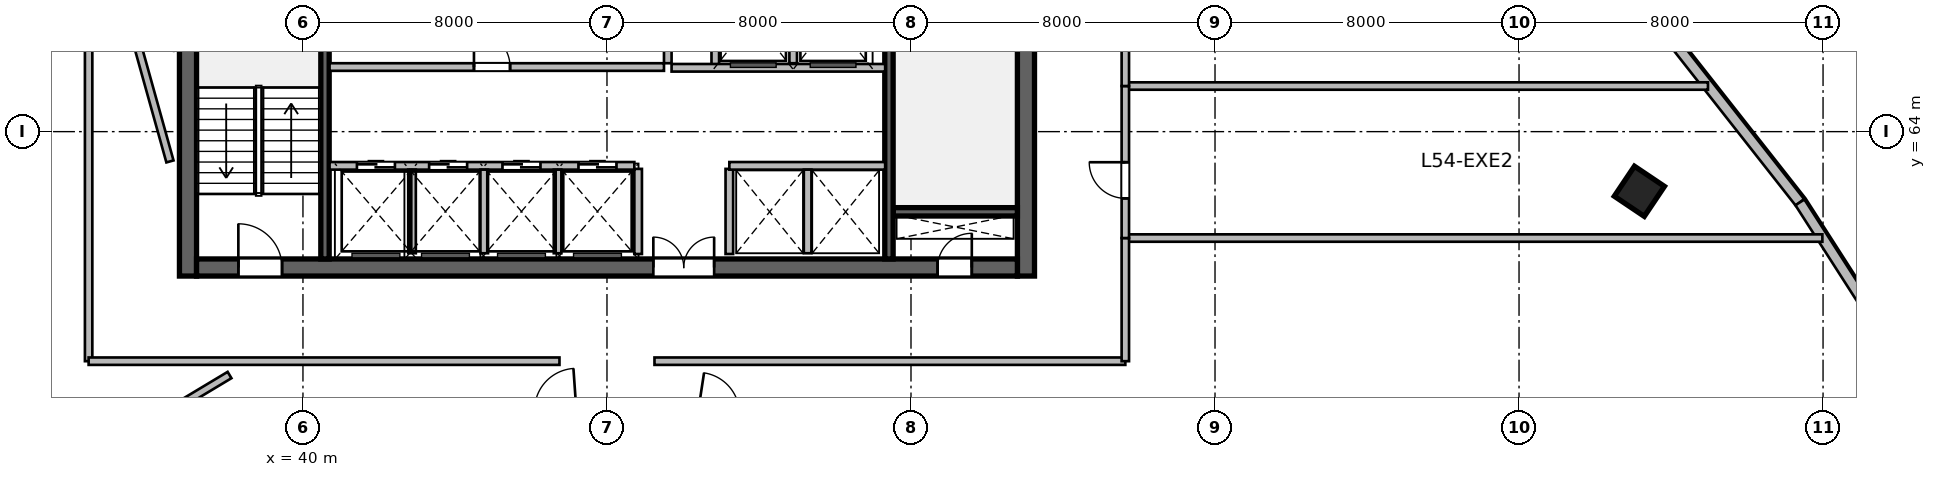
"""IFC4 building model, lengths in metres.
Left out: names, types, materials, properties, quantities, classifications, styles, units other than length and angle.
Written with IfcOpenShell. Run it as: python <this file> out.ifc"""

import sys

from ifc_helpers import new_model, si_unit, direction, frame, frame_2d, origin, origin_2d, place, context, subcontext, project, spatial, rectangle, extrude, source, transform, mapped, element, fill, save


model = new_model("IFC4")
c1 = context("Model", 3, precision=1e-05, world=origin(), true_north=direction((0.0, 1.0)))
c2 = subcontext(c1, "Body", "Model", "MODEL_VIEW")
j1 = project(units=[si_unit("LENGTHUNIT", "METRE"), si_unit("PLANEANGLEUNIT", "RADIAN")], contexts=[c1])
p1 = place(None, origin())
s1 = spatial("IfcSite", under=j1, at=p1, CompositionType="ELEMENT")
p2 = place(p1, origin())
s2 = spatial("IfcBuilding", under=s1, at=p2, CompositionType="ELEMENT")
p3 = place(p2, frame((0.0, 0.0, 223.5)))
s3 = spatial("IfcBuildingStorey", under=s2, at=p3, CompositionType="ELEMENT", Elevation=223.5)
m1 = source(origin(), c2, "Body", "SweptSolid", [
    extrude(rectangle(XDim=12.0, YDim=0.45, at=frame_2d((6.0, 0.0))), origin(), (0.0, 0.0, 1.0), 3.9),
])
for number, where, z_axis, x_axis in (
    (1, (36.975, 60.2, 0.0), (0.0, 0.0, 1.0), (0.0, 1.0, 0.0)),
    (2, (59.025, 60.2, 0.0), (0.0, 0.0, 1.0), (0.0, 1.0, 0.0)),
):
    element("IfcWall", number, at=place(p3, frame(where, z_axis=z_axis, x_axis=x_axis)), inside=s3, PredefinedType="SHEAR", context=c2, shape_type="MappedRepresentation", body=[
        mapped(m1, transform((0.0, 0.0, 0.0), scale=1.0)),
    ])
m2 = source(origin(), c2, "Body", "SweptSolid", [
    extrude(rectangle(XDim=21.6, YDim=0.45, at=frame_2d((10.8, 0.0))), origin(), (0.0, 0.0, 1.0), 3.9),
])
p4 = place(p3, frame((37.2, 60.425, 0.0), z_axis=(0.0, 0.0, 1.0), x_axis=(1.0, 0.0, 0.0)))
e3 = element("IfcWall", 3, at=p4, inside=s3, PredefinedType="SHEAR", context=c2, shape_type="MappedRepresentation", body=[
    mapped(m2, transform((0.0, 0.0, 0.0), scale=1.0)),
])
p5 = place(p4, frame((1.1, 0.0, 0.0)))
e4 = element("IfcOpeningElement", 4, at=p5, cuts=e3, PredefinedType="OPENING", context=c2, shape_type="SweptSolid", body=[
    extrude(rectangle(XDim=1.15, YDim=2.15, at=frame_2d((0.575, 1.075))), frame((0.0, 0.235, 0.0), z_axis=(0.0, -1.0, 0.0), x_axis=(1.0, 0.0, 0.0)), (0.0, 0.0, 1.0), 0.47),
])
p6 = place(p4, frame((19.5, 0.0, 0.0)))
e5 = element("IfcOpeningElement", 5, at=p6, cuts=e3, PredefinedType="OPENING", context=c2, shape_type="SweptSolid", body=[
    extrude(rectangle(XDim=0.9, YDim=2.1, at=frame_2d((0.45, 1.05))), frame((0.0, 0.235, 0.0), z_axis=(0.0, -1.0, 0.0), x_axis=(1.0, 0.0, 0.0)), (0.0, 0.0, 1.0), 0.47),
])
p7 = place(p4, frame((12.02, 0.0, 0.0)))
e6 = element("IfcOpeningElement", 6, at=p7, cuts=e3, PredefinedType="OPENING", context=c2, shape_type="SweptSolid", body=[
    extrude(rectangle(XDim=1.6, YDim=2.15, at=frame_2d((0.8, 1.075))), frame((0.0, 0.235, 0.0), z_axis=(0.0, -1.0, 0.0), x_axis=(1.0, 0.0, 0.0)), (0.0, 0.0, 1.0), 0.47),
])
m3 = source(origin(), c2, "Body", "SweptSolid", [
    extrude(rectangle(XDim=3.27, YDim=0.22, at=frame_2d((1.635, 0.0))), origin(), (0.0, 0.0, 1.0), 3.9),
])
p8 = place(p3, frame((55.53, 61.89, 0.0), z_axis=(0.0, 0.0, 1.0), x_axis=(1.0, 0.0, 0.0)))
e7 = element("IfcWall", 7, at=p8, inside=s3, PredefinedType="SHEAR", context=c2, shape_type="MappedRepresentation", body=[
    mapped(m3, transform((0.0, 0.0, 0.0), scale=1.0)),
])
m4 = source(origin(), c2, "Body", "SweptSolid", [
    extrude(rectangle(XDim=11.1, YDim=0.22, at=frame_2d((5.55, 0.0))), origin(), (0.0, 0.0, 1.0), 3.9),
])
p9 = place(p3, frame((40.58, 60.65, 0.0), z_axis=(0.0, 0.0, 1.0), x_axis=(0.0, 1.0, 0.0)))
e8 = element("IfcWall", 8, at=p9, inside=s3, PredefinedType="SHEAR", context=c2, shape_type="MappedRepresentation", body=[
    mapped(m4, transform((0.0, 0.0, 0.0), scale=1.0)),
])
p10 = place(p3, frame((55.42, 60.65, 0.0), z_axis=(0.0, 0.0, 1.0), x_axis=(0.0, 1.0, 0.0)))
e9 = element("IfcWall", 9, at=p10, inside=s3, PredefinedType="SHEAR", context=c2, shape_type="MappedRepresentation", body=[
    mapped(m4, transform((0.0, 0.0, 0.0), scale=1.0)),
])
p11 = place(p10, frame((9.595, 0.0, 0.0)))
e10 = element("IfcOpeningElement", 10, at=p11, cuts=e9, PredefinedType="OPENING", context=c2, shape_type="SweptSolid", body=[
    extrude(rectangle(XDim=1.15, YDim=2.15, at=frame_2d((0.575, 1.075))), frame((0.0, 0.12, 0.0), z_axis=(0.0, -1.0, 0.0), x_axis=(1.0, 0.0, 0.0)), (0.0, 0.0, 1.0), 0.24),
])
m5 = source(origin(), c2, "Body", "SweptSolid", [
    extrude(rectangle(XDim=0.95, YDim=0.95, at=origin_2d()), origin(), (0.0, 0.0, 1.0), 3.9),
])
p12 = place(p3, frame((75.167, 62.43, 0.0), z_axis=(0.0, 0.0, 1.0), x_axis=(0.55774510898, 0.830012285095, 0.0)))
e11 = element("IfcColumn", 11, at=p12, inside=s3, PredefinedType="COLUMN", context=c2, shape_type="MappedRepresentation", body=[
    mapped(m5, transform((0.0, 0.0, 0.0), scale=1.0)),
])
m6 = source(origin(), c2, "Body", "SweptSolid", [
    extrude(rectangle(XDim=5.153, YDim=0.28, at=frame_2d((2.577, 0.0))), origin(), (0.0, 0.0, 1.0), 3.64),
])
p13 = place(p3, frame((76.205, 66.19, 0.0), z_axis=(0.0, 0.0, 1.0), x_axis=(0.618179283891, -0.786037132054, 0.0)))
e12 = element("IfcWall", 12, at=p13, inside=s3, PredefinedType="SOLIDWALL", context=c2, shape_type="MappedRepresentation", body=[
    mapped(m6, transform((0.0, 0.0, 0.0), scale=1.0)),
])
m7 = source(origin(), c2, "Body", "SweptSolid", [
    extrude(rectangle(XDim=5.303, YDim=0.28, at=frame_2d((2.651, 0.0))), origin(), (0.0, 0.0, 1.0), 3.64),
])
p14 = place(p3, frame((79.391, 62.14, 0.0), z_axis=(0.0, 0.0, 1.0), x_axis=(0.540178067041, -0.84155074469, 0.0)))
e13 = element("IfcWall", 13, at=p14, inside=s3, PredefinedType="SOLIDWALL", context=c2, shape_type="MappedRepresentation", body=[
    mapped(m7, transform((0.0, 0.0, 0.0), scale=1.0)),
])
m8 = source(origin(), c2, "Body", "SweptSolid", [
    extrude(rectangle(XDim=2.24, YDim=0.2, at=frame_2d((1.12, 0.0))), origin(), (0.0, 0.0, 1.0), 3.64),
])
for number, where, z_axis, x_axis in (
    (14, (48.82, 60.78, 0.0), (0.0, 0.0, 1.0), (0.0, 1.0, 0.0)),
    (15, (51.22, 60.78, 0.0), (0.0, 0.0, 1.0), (0.0, 1.0, 0.0)),
):
    element("IfcWall", number, at=place(p3, frame(where, z_axis=z_axis, x_axis=x_axis)), inside=s3, PredefinedType="SOLIDWALL", context=c2, shape_type="MappedRepresentation", body=[
        mapped(m8, transform((0.0, 0.0, 0.0), scale=1.0)),
    ])
m9 = source(origin(), c2, "Body", "SweptSolid", [
    extrude(rectangle(XDim=5.8, YDim=0.2, at=frame_2d((2.9, 0.0))), origin(), (0.0, 0.0, 1.0), 3.64),
])
p15 = place(p3, frame((49.6, 65.8, 0.0), z_axis=(0.0, 0.0, 1.0), x_axis=(0.0, 1.0, 0.0)))
e16 = element("IfcWall", 16, at=p15, inside=s3, PredefinedType="SOLIDWALL", context=c2, shape_type="MappedRepresentation", body=[
    mapped(m9, transform((0.0, 0.0, 0.0), scale=1.0)),
])
m10 = source(origin(), c2, "Body", "SweptSolid", [
    extrude(rectangle(XDim=2.58, YDim=0.2, at=frame_2d((1.29, 0.0))), origin(), (0.0, 0.0, 1.0), 3.64),
])
p16 = place(p3, frame((50.85, 65.68, 0.0), z_axis=(0.0, 0.0, 1.0), x_axis=(0.0, 1.0, 0.0)))
e17 = element("IfcWall", 17, at=p16, inside=s3, PredefinedType="SOLIDWALL", context=c2, shape_type="MappedRepresentation", body=[
    mapped(m10, transform((0.0, 0.0, 0.0), scale=1.0)),
])
m11 = source(origin(), c2, "Body", "SweptSolid", [
    extrude(rectangle(XDim=2.4, YDim=0.2, at=frame_2d((1.2, 0.0))), origin(), (0.0, 0.0, 1.0), 3.64),
])
p17 = place(p3, frame((52.9, 65.8, 0.0), z_axis=(0.0, 0.0, 1.0), x_axis=(0.0, 1.0, 0.0)))
e18 = element("IfcWall", 18, at=p17, inside=s3, PredefinedType="SOLIDWALL", context=c2, shape_type="MappedRepresentation", body=[
    mapped(m11, transform((0.0, 0.0, 0.0), scale=1.0)),
])
m12 = source(origin(), c2, "Body", "SweptSolid", [
    extrude(rectangle(XDim=5.62, YDim=0.2, at=frame_2d((2.81, 0.0))), origin(), (0.0, 0.0, 1.0), 3.64),
])
p18 = place(p3, frame((49.7, 65.68, 0.0), z_axis=(0.0, 0.0, 1.0), x_axis=(1.0, 0.0, 0.0)))
e19 = element("IfcWall", 19, at=p18, inside=s3, PredefinedType="SOLIDWALL", context=c2, shape_type="MappedRepresentation", body=[
    mapped(m12, transform((0.0, 0.0, 0.0), scale=1.0)),
])
m13 = source(origin(), c2, "Body", "SweptSolid", [
    extrude(rectangle(XDim=8.02, YDim=0.2, at=frame_2d((4.01, 0.0))), origin(), (0.0, 0.0, 1.0), 3.64),
])
p19 = place(p3, frame((40.7, 63.1, 0.0), z_axis=(0.0, 0.0, 1.0), x_axis=(1.0, 0.0, 0.0)))
e20 = element("IfcWall", 20, at=p19, inside=s3, PredefinedType="SOLIDWALL", context=c2, shape_type="MappedRepresentation", body=[
    mapped(m13, transform((0.0, 0.0, 0.0), scale=1.0)),
])
p20 = place(p19, frame((0.72, 0.0, 0.0)))
e21 = element("IfcOpeningElement", 21, at=p20, cuts=e20, PredefinedType="OPENING", context=c2, shape_type="SweptSolid", body=[
    extrude(rectangle(XDim=1.0, YDim=2.15, at=frame_2d((0.5, 1.075))), frame((0.0, 0.11, 0.0), z_axis=(0.0, -1.0, 0.0), x_axis=(1.0, 0.0, 0.0)), (0.0, 0.0, 1.0), 0.22),
])
p21 = place(p19, frame((2.62, 0.0, 0.0)))
e22 = element("IfcOpeningElement", 22, at=p21, cuts=e20, PredefinedType="OPENING", context=c2, shape_type="SweptSolid", body=[
    extrude(rectangle(XDim=1.0, YDim=2.15, at=frame_2d((0.5, 1.075))), frame((0.0, 0.11, 0.0), z_axis=(0.0, -1.0, 0.0), x_axis=(1.0, 0.0, 0.0)), (0.0, 0.0, 1.0), 0.22),
])
p22 = place(p19, frame((4.55, 0.0, 0.0)))
e23 = element("IfcOpeningElement", 23, at=p22, cuts=e20, PredefinedType="OPENING", context=c2, shape_type="SweptSolid", body=[
    extrude(rectangle(XDim=1.0, YDim=2.15, at=frame_2d((0.5, 1.075))), frame((0.0, 0.11, 0.0), z_axis=(0.0, -1.0, 0.0), x_axis=(1.0, 0.0, 0.0)), (0.0, 0.0, 1.0), 0.22),
])
p23 = place(p19, frame((6.55, 0.0, 0.0)))
e24 = element("IfcOpeningElement", 24, at=p23, cuts=e20, PredefinedType="OPENING", context=c2, shape_type="SweptSolid", body=[
    extrude(rectangle(XDim=1.0, YDim=2.15, at=frame_2d((0.5, 1.075))), frame((0.0, 0.11, 0.0), z_axis=(0.0, -1.0, 0.0), x_axis=(1.0, 0.0, 0.0)), (0.0, 0.0, 1.0), 0.22),
])
m14 = source(origin(), c2, "Body", "SweptSolid", [
    extrude(rectangle(XDim=4.1, YDim=0.2, at=frame_2d((2.05, 0.0))), origin(), (0.0, 0.0, 1.0), 3.64),
])
p24 = place(p3, frame((51.22, 63.1, 0.0), z_axis=(0.0, 0.0, 1.0), x_axis=(1.0, 0.0, 0.0)))
e25 = element("IfcWall", 25, at=p24, inside=s3, PredefinedType="SOLIDWALL", context=c2, shape_type="MappedRepresentation", body=[
    mapped(m14, transform((0.0, 0.0, 0.0), scale=1.0)),
])
m15 = source(origin(), c2, "Body", "SweptSolid", [
    extrude(rectangle(XDim=2.2, YDim=0.2, at=frame_2d((1.1, 0.0))), origin(), (0.0, 0.0, 1.0), 3.64),
])
for number, where, z_axis, x_axis in (
    (26, (42.87, 60.8, 0.0), (0.0, 0.0, 1.0), (0.0, 1.0, 0.0)),
    (27, (44.77, 60.8, 0.0), (0.0, 0.0, 1.0), (0.0, 1.0, 0.0)),
    (28, (46.7, 60.8, 0.0), (0.0, 0.0, 1.0), (0.0, 1.0, 0.0)),
    (29, (53.28, 60.8, 0.0), (0.0, 0.0, 1.0), (0.0, 1.0, 0.0)),
):
    element("IfcWall", number, at=place(p3, frame(where, z_axis=z_axis, x_axis=x_axis)), inside=s3, PredefinedType="SOLIDWALL", context=c2, shape_type="MappedRepresentation", body=[
        mapped(m15, transform((0.0, 0.0, 0.0), scale=1.0)),
    ])
m16 = source(origin(), c2, "Body", "SweptSolid", [
    extrude(rectangle(XDim=8.8, YDim=0.2, at=frame_2d((4.4, 0.0))), origin(), (0.0, 0.0, 1.0), 3.64),
])
p25 = place(p3, frame((40.7, 65.7, 0.0), z_axis=(0.0, 0.0, 1.0), x_axis=(1.0, 0.0, 0.0)))
e30 = element("IfcWall", 30, at=p25, inside=s3, PredefinedType="SOLIDWALL", context=c2, shape_type="MappedRepresentation", body=[
    mapped(m16, transform((0.0, 0.0, 0.0), scale=1.0)),
])
p26 = place(p25, frame((3.8, 0.0, 0.0)))
e31 = element("IfcOpeningElement", 31, at=p26, cuts=e30, PredefinedType="OPENING", context=c2, shape_type="SweptSolid", body=[
    extrude(rectangle(XDim=0.95, YDim=2.15, at=frame_2d((0.475, 1.075))), frame((0.0, 0.11, 0.0), z_axis=(0.0, -1.0, 0.0), x_axis=(1.0, 0.0, 0.0)), (0.0, 0.0, 1.0), 0.22),
])
m17 = source(origin(), c2, "Body", "SweptSolid", [
    extrude(rectangle(XDim=3.817, YDim=0.195, at=frame_2d((1.909, 0.0))), origin(), (0.0, 0.0, 1.0), 3.64),
])
p27 = place(p3, frame((34.795, 55.632, 0.0), z_axis=(0.0, 0.0, 1.0), x_axis=(0.857453418218, 0.514561595522, 0.0)))
e32 = element("IfcWall", 32, at=p27, inside=s3, PredefinedType="PARTITIONING", context=c2, shape_type="MappedRepresentation", body=[
    mapped(m17, transform((0.0, 0.0, 0.0), scale=1.0)),
])
m18 = source(origin(), c2, "Body", "SweptSolid", [
    extrude(rectangle(XDim=13.694, YDim=0.195, at=frame_2d((6.847, 0.0))), origin(), (0.0, 0.0, 1.0), 3.64),
])
p28 = place(p3, frame((36.5, 63.216, 0.0), z_axis=(0.0, 0.0, 1.0), x_axis=(-0.268753576604, 0.963208967495, 0.0)))
e33 = element("IfcWall", 33, at=p28, inside=s3, PredefinedType="PARTITIONING", context=c2, shape_type="MappedRepresentation", body=[
    mapped(m18, transform((0.0, 0.0, 0.0), scale=1.0)),
])
m19 = source(origin(), c2, "Body", "SweptSolid", [
    extrude(rectangle(XDim=19.209, YDim=0.195, at=frame_2d((9.604, 0.0))), origin(), (0.0, 0.0, 1.0), 3.64),
])
p29 = place(p3, frame((34.36, 57.96, 0.0), z_axis=(0.0, 0.0, 1.0), x_axis=(0.0, 1.0, 0.0)))
e34 = element("IfcWall", 34, at=p29, inside=s3, PredefinedType="PARTITIONING", context=c2, shape_type="MappedRepresentation", body=[
    mapped(m19, transform((0.0, 0.0, 0.0), scale=1.0)),
])
m20 = source(origin(), c2, "Body", "SweptSolid", [
    extrude(rectangle(XDim=12.39, YDim=0.195, at=frame_2d((6.195, 0.0))), origin(), (0.0, 0.0, 1.0), 3.64),
])
for number, where, z_axis, x_axis in (
    (35, (34.36, 57.96, 0.0), (0.0, 0.0, 1.0), (1.0, 0.0, 0.0)),
    (36, (49.25, 57.96, 0.0), (0.0, 0.0, 1.0), (1.0, 0.0, 0.0)),
):
    element("IfcWall", number, at=place(p3, frame(where, z_axis=z_axis, x_axis=x_axis)), inside=s3, PredefinedType="PARTITIONING", context=c2, shape_type="MappedRepresentation", body=[
        mapped(m20, transform((0.0, 0.0, 0.0), scale=1.0)),
    ])
m21 = source(origin(), c2, "Body", "SweptSolid", [
    extrude(rectangle(XDim=18.342, YDim=0.195, at=frame_2d((9.171, 0.0))), origin(), (0.0, 0.0, 1.0), 3.64),
])
p30 = place(p3, frame((61.64, 61.2, 0.0), z_axis=(0.0, 0.0, 1.0), x_axis=(1.0, 0.0, 0.0)))
e37 = element("IfcWall", 37, at=p30, inside=s3, PredefinedType="PARTITIONING", context=c2, shape_type="MappedRepresentation", body=[
    mapped(m21, transform((0.0, 0.0, 0.0), scale=1.0)),
])
m22 = source(origin(), c2, "Body", "SweptSolid", [
    extrude(rectangle(XDim=3.24, YDim=0.195, at=frame_2d((1.62, 0.0))), origin(), (0.0, 0.0, 1.0), 3.64),
])
p31 = place(p3, frame((61.64, 57.96, 0.0), z_axis=(0.0, 0.0, 1.0), x_axis=(0.0, 1.0, 0.0)))
e38 = element("IfcWall", 38, at=p31, inside=s3, PredefinedType="PARTITIONING", context=c2, shape_type="MappedRepresentation", body=[
    mapped(m22, transform((0.0, 0.0, 0.0), scale=1.0)),
])
m23 = source(origin(), c2, "Body", "SweptSolid", [
    extrude(rectangle(XDim=15.332, YDim=0.195, at=frame_2d((7.666, 0.0))), origin(), (0.0, 0.0, 1.0), 3.64),
])
p32 = place(p3, frame((61.64, 65.2, 0.0), z_axis=(0.0, 0.0, 1.0), x_axis=(1.0, 0.0, 0.0)))
e39 = element("IfcWall", 39, at=p32, inside=s3, PredefinedType="PARTITIONING", context=c2, shape_type="MappedRepresentation", body=[
    mapped(m23, transform((0.0, 0.0, 0.0), scale=1.0)),
])
m24 = source(origin(), c2, "Body", "SweptSolid", [
    extrude(rectangle(XDim=4.0, YDim=0.195, at=frame_2d((2.0, 0.0))), origin(), (0.0, 0.0, 1.0), 3.64),
])
p33 = place(p3, frame((61.64, 61.2, 0.0), z_axis=(0.0, 0.0, 1.0), x_axis=(0.0, 1.0, 0.0)))
e40 = element("IfcWall", 40, at=p33, inside=s3, PredefinedType="PARTITIONING", context=c2, shape_type="MappedRepresentation", body=[
    mapped(m24, transform((0.0, 0.0, 0.0), scale=1.0)),
])
p34 = place(p33, frame((1.045, 0.0, 0.0)))
e41 = element("IfcOpeningElement", 41, at=p34, cuts=e40, PredefinedType="OPENING", context=c2, shape_type="SweptSolid", body=[
    extrude(rectangle(XDim=0.95, YDim=2.1, at=frame_2d((0.475, 1.05))), frame((0.0, 0.107, 0.0), z_axis=(0.0, -1.0, 0.0), x_axis=(1.0, 0.0, 0.0)), (0.0, 0.0, 1.0), 0.215),
])
m25 = source(origin(), c2, "Body", "SweptSolid", [
    extrude(rectangle(XDim=11.969, YDim=0.195, at=frame_2d((5.984, 0.0))), origin(), (0.0, 0.0, 1.0), 3.64),
])
p35 = place(p3, frame((61.64, 65.2, 0.0), z_axis=(0.0, 0.0, 1.0), x_axis=(0.0, 1.0, 0.0)))
e42 = element("IfcWall", 42, at=p35, inside=s3, PredefinedType="PARTITIONING", context=c2, shape_type="MappedRepresentation", body=[
    mapped(m25, transform((0.0, 0.0, 0.0), scale=1.0)),
])
p36 = place(p35, frame((5.51, 0.0, 0.0)))
e43 = element("IfcOpeningElement", 43, at=p36, cuts=e42, PredefinedType="OPENING", context=c2, shape_type="SweptSolid", body=[
    extrude(rectangle(XDim=0.95, YDim=2.1, at=frame_2d((0.475, 1.05))), frame((0.0, 0.107, 0.0), z_axis=(0.0, -1.0, 0.0), x_axis=(1.0, 0.0, 0.0)), (0.0, 0.0, 1.0), 0.215),
])
m26 = source(origin(), c2, "Body", "SweptSolid", [
    extrude(rectangle(XDim=1.15, YDim=2.15, at=frame_2d((0.575, 1.075))), frame((0.0, 0.025, 0.0), z_axis=(0.0, -1.0, 0.0), x_axis=(1.0, 0.0, 0.0)), (0.0, 0.0, 1.0), 0.05),
])
p37 = place(p5, origin())
e44 = element("IfcDoor", 44, at=p37, inside=s3, OperationType="SINGLE_SWING_LEFT", PredefinedType="DOOR", context=c2, shape_type="MappedRepresentation", body=[
    mapped(m26, transform((0.0, 0.0, 0.0), scale=1.0)),
])
fill(e4, e44)
m27 = source(origin(), c2, "Body", "SweptSolid", [
    extrude(rectangle(XDim=0.9, YDim=2.1, at=frame_2d((0.45, 1.05))), frame((0.0, 0.025, 0.0), z_axis=(0.0, -1.0, 0.0), x_axis=(1.0, 0.0, 0.0)), (0.0, 0.0, 1.0), 0.05),
])
p38 = place(p6, origin())
e45 = element("IfcDoor", 45, at=p38, inside=s3, OperationType="SINGLE_SWING_RIGHT", PredefinedType="DOOR", context=c2, shape_type="MappedRepresentation", body=[
    mapped(m27, transform((0.0, 0.0, 0.0), scale=1.0)),
])
fill(e5, e45)
m28 = source(origin(), c2, "Body", "SweptSolid", [
    extrude(rectangle(XDim=1.6, YDim=2.15, at=frame_2d((0.8, 1.075))), frame((0.0, 0.025, 0.0), z_axis=(0.0, -1.0, 0.0), x_axis=(1.0, 0.0, 0.0)), (0.0, 0.0, 1.0), 0.05),
])
p39 = place(p7, origin())
e46 = element("IfcDoor", 46, at=p39, inside=s3, OperationType="DOUBLE_DOOR_SINGLE_SWING", PredefinedType="DOOR", context=c2, shape_type="MappedRepresentation", body=[
    mapped(m28, transform((0.0, 0.0, 0.0), scale=1.0)),
])
fill(e6, e46)
m29 = source(origin(), c2, "Body", "SweptSolid", [
    extrude(rectangle(XDim=1.0, YDim=2.15, at=frame_2d((0.5, 1.075))), frame((0.0, 0.025, 0.0), z_axis=(0.0, -1.0, 0.0), x_axis=(1.0, 0.0, 0.0)), (0.0, 0.0, 1.0), 0.05),
])
p40 = place(p20, origin())
e47 = element("IfcDoor", 47, at=p40, inside=s3, OperationType="DOUBLE_DOOR_SLIDING", PredefinedType="DOOR", context=c2, shape_type="MappedRepresentation", body=[
    mapped(m29, transform((0.0, 0.0, 0.0), scale=1.0)),
])
fill(e21, e47)
p41 = place(p21, origin())
e48 = element("IfcDoor", 48, at=p41, inside=s3, OperationType="DOUBLE_DOOR_SLIDING", PredefinedType="DOOR", context=c2, shape_type="MappedRepresentation", body=[
    mapped(m29, transform((0.0, 0.0, 0.0), scale=1.0)),
])
fill(e22, e48)
p42 = place(p22, origin())
e49 = element("IfcDoor", 49, at=p42, inside=s3, OperationType="DOUBLE_DOOR_SLIDING", PredefinedType="DOOR", context=c2, shape_type="MappedRepresentation", body=[
    mapped(m29, transform((0.0, 0.0, 0.0), scale=1.0)),
])
fill(e23, e49)
p43 = place(p23, origin())
e50 = element("IfcDoor", 50, at=p43, inside=s3, OperationType="DOUBLE_DOOR_SLIDING", PredefinedType="DOOR", context=c2, shape_type="MappedRepresentation", body=[
    mapped(m29, transform((0.0, 0.0, 0.0), scale=1.0)),
])
fill(e24, e50)
m30 = source(origin(), c2, "Body", "SweptSolid", [
    extrude(rectangle(XDim=0.95, YDim=2.15, at=frame_2d((0.475, 1.075))), frame((0.0, 0.025, 0.0), z_axis=(0.0, -1.0, 0.0), x_axis=(1.0, 0.0, 0.0)), (0.0, 0.0, 1.0), 0.05),
])
p44 = place(p26, origin())
e51 = element("IfcDoor", 51, at=p44, inside=s3, OperationType="SINGLE_SWING_LEFT", PredefinedType="DOOR", context=c2, shape_type="MappedRepresentation", body=[
    mapped(m30, transform((0.0, 0.0, 0.0), scale=1.0)),
])
fill(e31, e51)
m31 = source(origin(), c2, "Body", "SweptSolid", [
    extrude(rectangle(XDim=0.95, YDim=2.1, at=frame_2d((0.475, 1.05))), frame((0.0, 0.025, 0.0), z_axis=(0.0, -1.0, 0.0), x_axis=(1.0, 0.0, 0.0)), (0.0, 0.0, 1.0), 0.05),
])
p45 = place(p34, origin())
e52 = element("IfcDoor", 52, at=p45, inside=s3, OperationType="SINGLE_SWING_RIGHT", PredefinedType="DOOR", context=c2, shape_type="MappedRepresentation", body=[
    mapped(m31, transform((0.0, 0.0, 0.0), scale=1.0)),
])
fill(e41, e52)
save(model, sys.argv[1])
